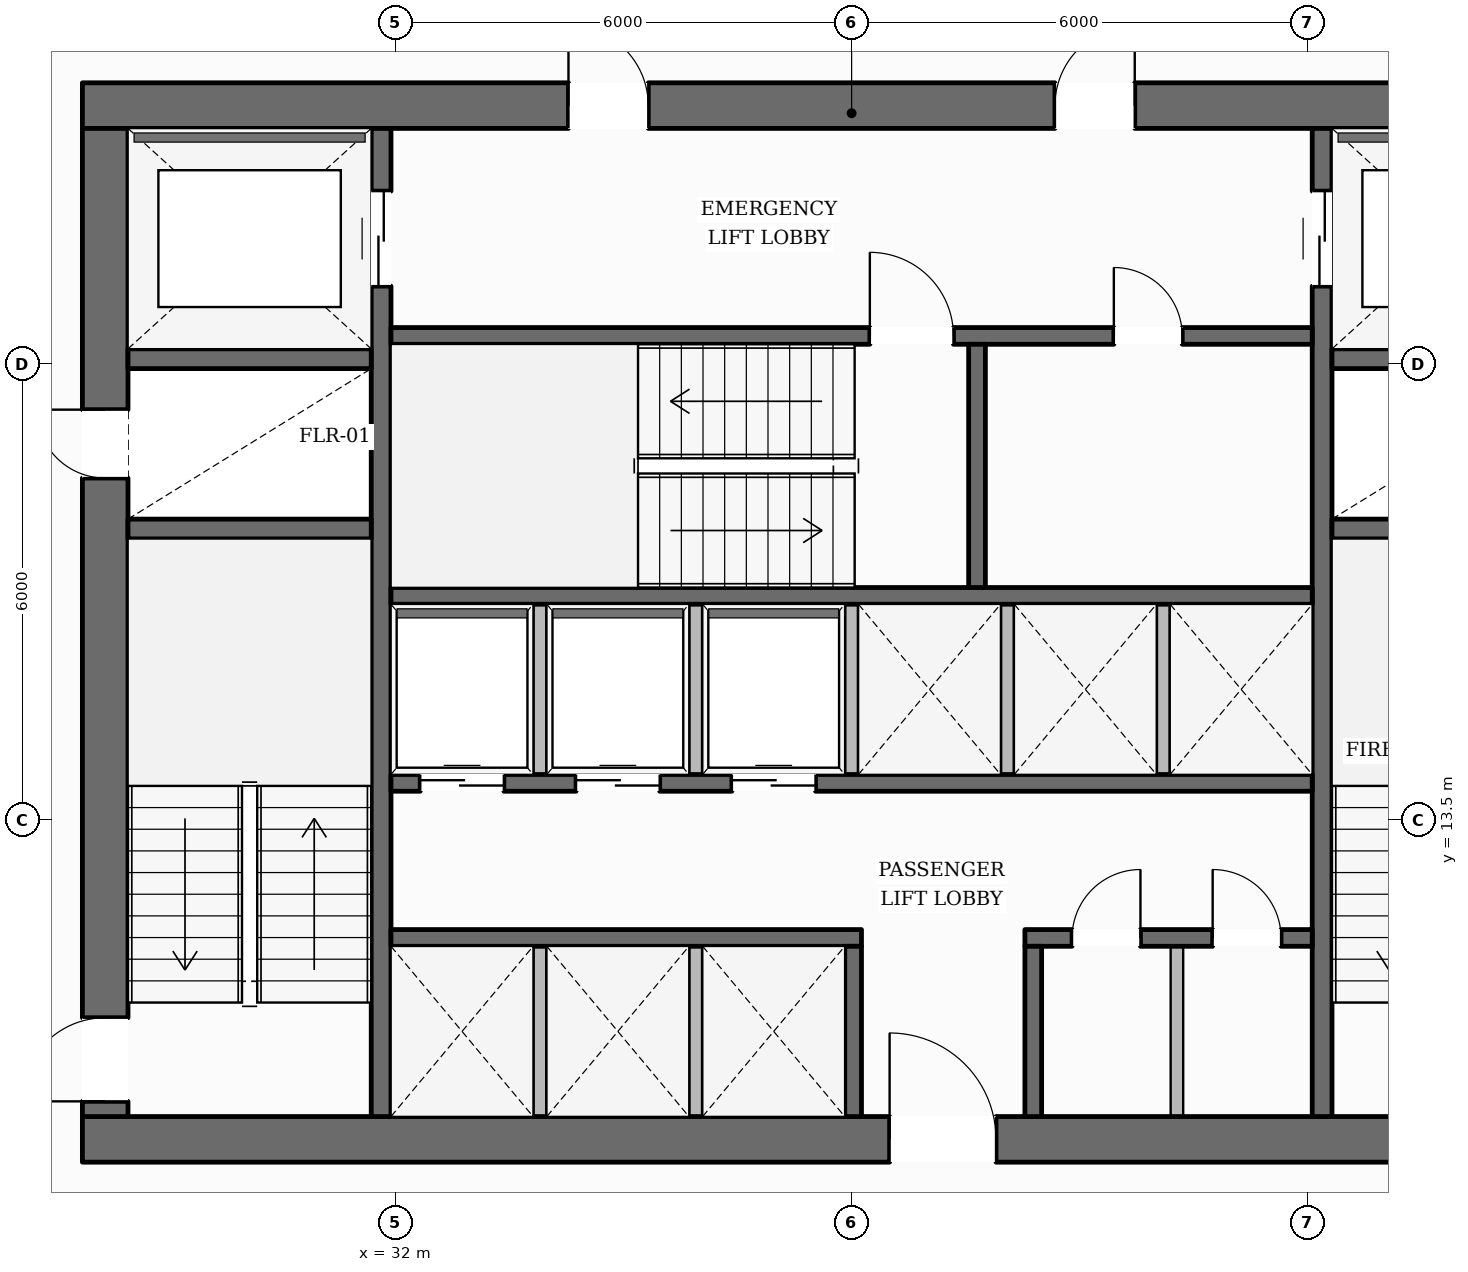
"""IFC4 building model, lengths in metres.
Left out: names, types, materials, properties, quantities, classifications, styles, units other than length and angle.
Written with IfcOpenShell. Run it as: python <this file> out.ifc"""

import sys

from ifc_helpers import new_model, si_unit, direction, frame, frame_2d, origin, place, context, subcontext, project, spatial, rectangle, extrude, element, fill, save


model = new_model("IFC4")
c1 = context("Model", 3, precision=1e-05, world=origin(), true_north=direction((0.0, 1.0)))
c2 = subcontext(c1, "Body", "Model", "MODEL_VIEW")
j1 = project(units=[si_unit("LENGTHUNIT", "METRE"), si_unit("PLANEANGLEUNIT", "RADIAN")], contexts=[c1])
p1 = place(None, origin())
s1 = spatial("IfcSite", under=j1, at=p1, CompositionType="ELEMENT")
p2 = place(p1, origin())
s2 = spatial("IfcBuilding", under=s1, at=p2, CompositionType="ELEMENT")
p3 = place(p2, frame((0.0, 0.0, 40.65)))
s3 = spatial("IfcBuildingStorey", under=s2, at=p3, CompositionType="ELEMENT", Elevation=40.65)
p4 = place(p3, frame((27.88, 9.3, 0.0), z_axis=(0.0, 0.0, 1.0), x_axis=(1.0, 0.0, 0.0)))
e1 = element("IfcWall", 1, at=p4, inside=s3, PredefinedType="SOLIDWALL", context=c2, shape_type="SweptSolid", body=[
    extrude(rectangle(XDim=20.24, YDim=0.6, at=frame_2d((10.12, 0.0))), origin(), (0.0, 0.0, 1.0), 3.59),
])
p5 = place(p4, frame((10.62, 0.0, 0.0)))
e2 = element("IfcOpeningElement", 2, at=p5, cuts=e1, PredefinedType="OPENING", context=c2, shape_type="SweptSolid", body=[
    extrude(rectangle(XDim=1.4, YDim=2.2, at=frame_2d((0.7, 1.1))), frame((0.0, 0.31, 0.0), z_axis=(0.0, -1.0, 0.0), x_axis=(1.0, 0.0, 0.0)), (0.0, 0.0, 1.0), 0.62),
])
p6 = place(p3, frame((27.88, 22.9, 0.0), z_axis=(0.0, 0.0, 1.0), x_axis=(1.0, 0.0, 0.0)))
e3 = element("IfcWall", 3, at=p6, inside=s3, PredefinedType="SOLIDWALL", context=c2, shape_type="SweptSolid", body=[
    extrude(rectangle(XDim=20.24, YDim=0.6, at=frame_2d((10.12, 0.0))), origin(), (0.0, 0.0, 1.0), 3.59),
])
p7 = place(p6, frame((6.395, 0.0, 0.0)))
e4 = element("IfcOpeningElement", 4, at=p7, cuts=e3, PredefinedType="OPENING", context=c2, shape_type="SweptSolid", body=[
    extrude(rectangle(XDim=1.05, YDim=2.15, at=frame_2d((0.525, 1.075))), frame((0.0, 0.31, 0.0), z_axis=(0.0, -1.0, 0.0), x_axis=(1.0, 0.0, 0.0)), (0.0, 0.0, 1.0), 0.62),
])
p8 = place(p6, frame((12.795, 0.0, 0.0)))
e5 = element("IfcOpeningElement", 5, at=p8, cuts=e3, PredefinedType="OPENING", context=c2, shape_type="SweptSolid", body=[
    extrude(rectangle(XDim=1.05, YDim=2.15, at=frame_2d((0.525, 1.075))), frame((0.0, 0.31, 0.0), z_axis=(0.0, -1.0, 0.0), x_axis=(1.0, 0.0, 0.0)), (0.0, 0.0, 1.0), 0.62),
])
p9 = place(p3, frame((28.18, 9.6, 0.0), z_axis=(0.0, 0.0, 1.0), x_axis=(0.0, 1.0, 0.0)))
e6 = element("IfcWall", 6, at=p9, inside=s3, PredefinedType="SOLIDWALL", context=c2, shape_type="SweptSolid", body=[
    extrude(rectangle(XDim=13.0, YDim=0.6, at=frame_2d((6.5, 0.0))), origin(), (0.0, 0.0, 1.0), 3.59),
])
p10 = place(p9, frame((0.2, 0.0, 0.0)))
e7 = element("IfcOpeningElement", 7, at=p10, cuts=e6, PredefinedType="OPENING", context=c2, shape_type="SweptSolid", body=[
    extrude(rectangle(XDim=1.1, YDim=2.15, at=frame_2d((0.55, 1.075))), frame((0.0, 0.31, 0.0), z_axis=(0.0, -1.0, 0.0), x_axis=(1.0, 0.0, 0.0)), (0.0, 0.0, 1.0), 0.62),
])
p11 = place(p9, frame((8.4, 0.0, 0.0)))
e8 = element("IfcOpeningElement", 8, at=p11, cuts=e6, PredefinedType="OPENING", context=c2, shape_type="SweptSolid", body=[
    extrude(rectangle(XDim=0.9, YDim=2.1, at=frame_2d((0.45, 1.05))), frame((0.0, 0.31, 0.0), z_axis=(0.0, -1.0, 0.0), x_axis=(1.0, 0.0, 0.0)), (0.0, 0.0, 1.0), 0.62),
])
p12 = place(p3, frame((31.81, 9.6, 0.0), z_axis=(0.0, 0.0, 1.0), x_axis=(0.0, 1.0, 0.0)))
e9 = element("IfcWall", 9, at=p12, inside=s3, PredefinedType="SHEAR", context=c2, shape_type="SweptSolid", body=[
    extrude(rectangle(XDim=13.0, YDim=0.26, at=frame_2d((6.5, 0.0))), origin(), (0.0, 0.0, 1.0), 3.59),
])
p13 = place(p12, frame((10.925, 0.0, 0.0)))
e10 = element("IfcOpeningElement", 10, at=p13, cuts=e9, PredefinedType="OPENING", context=c2, shape_type="SweptSolid", body=[
    extrude(rectangle(XDim=1.25, YDim=2.25, at=frame_2d((0.625, 1.125))), frame((0.0, 0.14, 0.0), z_axis=(0.0, -1.0, 0.0), x_axis=(1.0, 0.0, 0.0)), (0.0, 0.0, 1.0), 0.28),
])
p14 = place(p3, frame((44.19, 9.6, 0.0), z_axis=(0.0, 0.0, 1.0), x_axis=(0.0, 1.0, 0.0)))
e11 = element("IfcWall", 11, at=p14, inside=s3, PredefinedType="SHEAR", context=c2, shape_type="SweptSolid", body=[
    extrude(rectangle(XDim=13.0, YDim=0.26, at=frame_2d((6.5, 0.0))), origin(), (0.0, 0.0, 1.0), 3.59),
])
p15 = place(p14, frame((10.925, 0.0, 0.0)))
e12 = element("IfcOpeningElement", 12, at=p15, cuts=e11, PredefinedType="OPENING", context=c2, shape_type="SweptSolid", body=[
    extrude(rectangle(XDim=1.25, YDim=2.25, at=frame_2d((0.625, 1.125))), frame((0.0, 0.14, 0.0), z_axis=(0.0, -1.0, 0.0), x_axis=(1.0, 0.0, 0.0)), (0.0, 0.0, 1.0), 0.28),
])
for number, where, z_axis, x_axis in (
    (13, (28.48, 17.33, 0.0), (0.0, 0.0, 1.0), (1.0, 0.0, 0.0)),
    (14, (28.48, 19.57, 0.0), (0.0, 0.0, 1.0), (1.0, 0.0, 0.0)),
    (15, (44.32, 17.33, 0.0), (0.0, 0.0, 1.0), (1.0, 0.0, 0.0)),
    (16, (44.32, 19.57, 0.0), (0.0, 0.0, 1.0), (1.0, 0.0, 0.0)),
):
    element("IfcWall", number, at=place(p3, frame(where, z_axis=z_axis, x_axis=x_axis)), inside=s3, PredefinedType="SHEAR", context=c2, shape_type="SweptSolid", body=[
        extrude(rectangle(XDim=3.2, YDim=0.26, at=frame_2d((1.6, 0.0))), origin(), (0.0, 0.0, 1.0), 3.59),
    ])
p16 = place(p3, frame((31.94, 19.87, 0.0), z_axis=(0.0, 0.0, 1.0), x_axis=(1.0, 0.0, 0.0)))
e17 = element("IfcWall", 17, at=p16, inside=s3, PredefinedType="SOLIDWALL", context=c2, shape_type="SweptSolid", body=[
    extrude(rectangle(XDim=12.12, YDim=0.22, at=frame_2d((6.06, 0.0))), origin(), (0.0, 0.0, 1.0), 3.59),
])
p17 = place(p16, frame((6.3, 0.0, 0.0)))
e18 = element("IfcOpeningElement", 18, at=p17, cuts=e17, PredefinedType="OPENING", context=c2, shape_type="SweptSolid", body=[
    extrude(rectangle(XDim=1.1, YDim=2.15, at=frame_2d((0.55, 1.075))), frame((0.0, 0.12, 0.0), z_axis=(0.0, -1.0, 0.0), x_axis=(1.0, 0.0, 0.0)), (0.0, 0.0, 1.0), 0.24),
])
p18 = place(p16, frame((9.51, 0.0, 0.0)))
e19 = element("IfcOpeningElement", 19, at=p18, cuts=e17, PredefinedType="OPENING", context=c2, shape_type="SweptSolid", body=[
    extrude(rectangle(XDim=0.9, YDim=2.1, at=frame_2d((0.45, 1.05))), frame((0.0, 0.12, 0.0), z_axis=(0.0, -1.0, 0.0), x_axis=(1.0, 0.0, 0.0)), (0.0, 0.0, 1.0), 0.24),
])
p19 = place(p3, frame((31.94, 16.45, 0.0), z_axis=(0.0, 0.0, 1.0), x_axis=(1.0, 0.0, 0.0)))
e20 = element("IfcWall", 20, at=p19, inside=s3, PredefinedType="SOLIDWALL", context=c2, shape_type="SweptSolid", body=[
    extrude(rectangle(XDim=12.12, YDim=0.22, at=frame_2d((6.06, 0.0))), origin(), (0.0, 0.0, 1.0), 3.59),
])
p20 = place(p3, frame((39.65, 16.56, 0.0), z_axis=(0.0, 0.0, 1.0), x_axis=(0.0, 1.0, 0.0)))
e21 = element("IfcWall", 21, at=p20, inside=s3, PredefinedType="SOLIDWALL", context=c2, shape_type="SweptSolid", body=[
    extrude(rectangle(XDim=3.2, YDim=0.22, at=frame_2d((1.6, 0.0))), origin(), (0.0, 0.0, 1.0), 3.59),
])
p21 = place(p3, frame((31.94, 13.99, 0.0), z_axis=(0.0, 0.0, 1.0), x_axis=(1.0, 0.0, 0.0)))
e22 = element("IfcWall", 22, at=p21, inside=s3, PredefinedType="SOLIDWALL", context=c2, shape_type="SweptSolid", body=[
    extrude(rectangle(XDim=12.12, YDim=0.22, at=frame_2d((6.06, 0.0))), origin(), (0.0, 0.0, 1.0), 3.59),
])
p22 = place(p21, frame((0.385, 0.0, 0.0)))
e23 = element("IfcOpeningElement", 23, at=p22, cuts=e22, PredefinedType="OPENING", context=c2, shape_type="SweptSolid", body=[
    extrude(rectangle(XDim=1.1, YDim=2.2, at=frame_2d((0.55, 1.1))), frame((0.0, 0.12, 0.0), z_axis=(0.0, -1.0, 0.0), x_axis=(1.0, 0.0, 0.0)), (0.0, 0.0, 1.0), 0.24),
])
p23 = place(p21, frame((2.435, 0.0, 0.0)))
e24 = element("IfcOpeningElement", 24, at=p23, cuts=e22, PredefinedType="OPENING", context=c2, shape_type="SweptSolid", body=[
    extrude(rectangle(XDim=1.1, YDim=2.2, at=frame_2d((0.55, 1.1))), frame((0.0, 0.12, 0.0), z_axis=(0.0, -1.0, 0.0), x_axis=(1.0, 0.0, 0.0)), (0.0, 0.0, 1.0), 0.24),
])
p24 = place(p21, frame((4.485, 0.0, 0.0)))
e25 = element("IfcOpeningElement", 25, at=p24, cuts=e22, PredefinedType="OPENING", context=c2, shape_type="SweptSolid", body=[
    extrude(rectangle(XDim=1.1, YDim=2.2, at=frame_2d((0.55, 1.1))), frame((0.0, 0.12, 0.0), z_axis=(0.0, -1.0, 0.0), x_axis=(1.0, 0.0, 0.0)), (0.0, 0.0, 1.0), 0.24),
])
p25 = place(p3, frame((31.94, 11.95, 0.0), z_axis=(0.0, 0.0, 1.0), x_axis=(1.0, 0.0, 0.0)))
e26 = element("IfcWall", 26, at=p25, inside=s3, PredefinedType="SOLIDWALL", context=c2, shape_type="SweptSolid", body=[
    extrude(rectangle(XDim=6.19, YDim=0.22, at=frame_2d((3.095, 0.0))), origin(), (0.0, 0.0, 1.0), 3.59),
])
p26 = place(p3, frame((40.28, 11.95, 0.0), z_axis=(0.0, 0.0, 1.0), x_axis=(1.0, 0.0, 0.0)))
e27 = element("IfcWall", 27, at=p26, inside=s3, PredefinedType="SOLIDWALL", context=c2, shape_type="SweptSolid", body=[
    extrude(rectangle(XDim=3.78, YDim=0.22, at=frame_2d((1.89, 0.0))), origin(), (0.0, 0.0, 1.0), 3.59),
])
p27 = place(p26, frame((0.62, 0.0, 0.0)))
e28 = element("IfcOpeningElement", 28, at=p27, cuts=e27, PredefinedType="OPENING", context=c2, shape_type="SweptSolid", body=[
    extrude(rectangle(XDim=0.9, YDim=2.1, at=frame_2d((0.45, 1.05))), frame((0.0, 0.12, 0.0), z_axis=(0.0, -1.0, 0.0), x_axis=(1.0, 0.0, 0.0)), (0.0, 0.0, 1.0), 0.24),
])
p28 = place(p26, frame((2.47, 0.0, 0.0)))
e29 = element("IfcOpeningElement", 29, at=p28, cuts=e27, PredefinedType="OPENING", context=c2, shape_type="SweptSolid", body=[
    extrude(rectangle(XDim=0.9, YDim=2.1, at=frame_2d((0.45, 1.05))), frame((0.0, 0.12, 0.0), z_axis=(0.0, -1.0, 0.0), x_axis=(1.0, 0.0, 0.0)), (0.0, 0.0, 1.0), 0.24),
])
for number, where, z_axis, x_axis in (
    (30, (38.02, 9.6, 0.0), (0.0, 0.0, 1.0), (0.0, 1.0, 0.0)),
    (31, (40.39, 9.6, 0.0), (0.0, 0.0, 1.0), (0.0, 1.0, 0.0)),
):
    element("IfcWall", number, at=place(p3, frame(where, z_axis=z_axis, x_axis=x_axis)), inside=s3, PredefinedType="SOLIDWALL", context=c2, shape_type="SweptSolid", body=[
        extrude(rectangle(XDim=2.24, YDim=0.22, at=frame_2d((1.12, 0.0))), origin(), (0.0, 0.0, 1.0), 3.59),
    ])
p29 = place(p3, frame((13.324, 14.608, 0.0), z_axis=(0.0, 0.0, 1.0), x_axis=(0.495909124573, 0.868374423947, 0.0)))
e32 = element("IfcWall", 32, at=p29, inside=s3, PredefinedType="STANDARD", context=c2, shape_type="SweptSolid", body=[
    extrude(rectangle(XDim=34.553, YDim=0.38, at=frame_2d((17.277, 0.0))), origin(), (0.0, 0.0, 1.0), 2.97),
])
p30 = place(p29, frame((30.448, 0.0, 0.65)))
e33 = element("IfcOpeningElement", 33, at=p30, cuts=e32, PredefinedType="OPENING", context=c2, shape_type="SweptSolid", body=[
    extrude(rectangle(XDim=1.65, YDim=1.75, at=frame_2d((0.825, 0.875))), frame((0.0, 0.2, 0.0), z_axis=(0.0, -1.0, 0.0), x_axis=(1.0, 0.0, 0.0)), (0.0, 0.0, 1.0), 0.4),
])
p31 = place(p29, frame((24.849, 0.0, 0.65)))
e34 = element("IfcOpeningElement", 34, at=p31, cuts=e32, PredefinedType="OPENING", context=c2, shape_type="SweptSolid", body=[
    extrude(rectangle(XDim=1.65, YDim=1.75, at=frame_2d((0.825, 0.875))), frame((0.0, 0.2, 0.0), z_axis=(0.0, -1.0, 0.0), x_axis=(1.0, 0.0, 0.0)), (0.0, 0.0, 1.0), 0.4),
])
p32 = place(p29, frame((19.249, 0.0, 0.65)))
e35 = element("IfcOpeningElement", 35, at=p32, cuts=e32, PredefinedType="OPENING", context=c2, shape_type="SweptSolid", body=[
    extrude(rectangle(XDim=1.65, YDim=1.75, at=frame_2d((0.825, 0.875))), frame((0.0, 0.2, 0.0), z_axis=(0.0, -1.0, 0.0), x_axis=(1.0, 0.0, 0.0)), (0.0, 0.0, 1.0), 0.4),
])
p33 = place(p29, frame((8.05, 0.0, 0.65)))
e36 = element("IfcOpeningElement", 36, at=p33, cuts=e32, PredefinedType="OPENING", context=c2, shape_type="SweptSolid", body=[
    extrude(rectangle(XDim=1.65, YDim=1.75, at=frame_2d((0.825, 0.875))), frame((0.0, 0.2, 0.0), z_axis=(0.0, -1.0, 0.0), x_axis=(1.0, 0.0, 0.0)), (0.0, 0.0, 1.0), 0.4),
])
p34 = place(p29, frame((2.451, 0.0, 0.65)))
e37 = element("IfcOpeningElement", 37, at=p34, cuts=e32, PredefinedType="OPENING", context=c2, shape_type="SweptSolid", body=[
    extrude(rectangle(XDim=1.65, YDim=1.75, at=frame_2d((0.825, 0.875))), frame((0.0, 0.2, 0.0), z_axis=(0.0, -1.0, 0.0), x_axis=(1.0, 0.0, 0.0)), (0.0, 0.0, 1.0), 0.4),
])
for number, where, z_axis, x_axis in (
    (38, (33.9, 9.6, 0.0), (0.0, 0.0, 1.0), (0.0, 1.0, 0.0)),
    (39, (35.95, 9.6, 0.0), (0.0, 0.0, 1.0), (0.0, 1.0, 0.0)),
    (40, (33.9, 14.1, 0.0), (0.0, 0.0, 1.0), (0.0, 1.0, 0.0)),
    (41, (35.95, 14.1, 0.0), (0.0, 0.0, 1.0), (0.0, 1.0, 0.0)),
    (42, (38.0, 14.1, 0.0), (0.0, 0.0, 1.0), (0.0, 1.0, 0.0)),
    (43, (40.05, 14.1, 0.0), (0.0, 0.0, 1.0), (0.0, 1.0, 0.0)),
    (44, (42.1, 14.1, 0.0), (0.0, 0.0, 1.0), (0.0, 1.0, 0.0)),
    (45, (42.28, 9.6, 0.0), (0.0, 0.0, 1.0), (0.0, 1.0, 0.0)),
):
    element("IfcWall", number, at=place(p3, frame(where, z_axis=z_axis, x_axis=x_axis)), inside=s3, PredefinedType="PARTITIONING", context=c2, shape_type="SweptSolid", body=[
        extrude(rectangle(XDim=2.24, YDim=0.165, at=frame_2d((1.12, 0.0))), origin(), (0.0, 0.0, 1.0), 3.59),
    ])
p35 = place(p10, origin())
e46 = element("IfcDoor", 46, at=p35, inside=s3, OperationType="SINGLE_SWING_LEFT", PredefinedType="DOOR", context=c2, shape_type="SweptSolid", body=[
    extrude(rectangle(XDim=1.1, YDim=2.15, at=frame_2d((0.55, 1.075))), frame((0.0, 0.025, 0.0), z_axis=(0.0, -1.0, 0.0), x_axis=(1.0, 0.0, 0.0)), (0.0, 0.0, 1.0), 0.05),
])
fill(e7, e46)
p36 = place(p17, origin())
e47 = element("IfcDoor", 47, at=p36, inside=s3, OperationType="SINGLE_SWING_LEFT", PredefinedType="DOOR", context=c2, shape_type="SweptSolid", body=[
    extrude(rectangle(XDim=1.1, YDim=2.15, at=frame_2d((0.55, 1.075))), frame((0.0, 0.025, 0.0), z_axis=(0.0, -1.0, 0.0), x_axis=(1.0, 0.0, 0.0)), (0.0, 0.0, 1.0), 0.05),
])
fill(e18, e47)
p37 = place(p11, origin())
e48 = element("IfcDoor", 48, at=p37, inside=s3, OperationType="SINGLE_SWING_RIGHT", PredefinedType="DOOR", context=c2, shape_type="SweptSolid", body=[
    extrude(rectangle(XDim=0.9, YDim=2.1, at=frame_2d((0.45, 1.05))), frame((0.0, 0.025, 0.0), z_axis=(0.0, -1.0, 0.0), x_axis=(1.0, 0.0, 0.0)), (0.0, 0.0, 1.0), 0.05),
])
fill(e8, e48)
p38 = place(p7, origin())
e49 = element("IfcDoor", 49, at=p38, inside=s3, OperationType="SINGLE_SWING_LEFT", PredefinedType="DOOR", context=c2, shape_type="SweptSolid", body=[
    extrude(rectangle(XDim=1.05, YDim=2.15, at=frame_2d((0.525, 1.075))), frame((0.0, 0.025, 0.0), z_axis=(0.0, -1.0, 0.0), x_axis=(1.0, 0.0, 0.0)), (0.0, 0.0, 1.0), 0.05),
])
fill(e4, e49)
p39 = place(p8, origin())
e50 = element("IfcDoor", 50, at=p39, inside=s3, OperationType="SINGLE_SWING_RIGHT", PredefinedType="DOOR", context=c2, shape_type="SweptSolid", body=[
    extrude(rectangle(XDim=1.05, YDim=2.15, at=frame_2d((0.525, 1.075))), frame((0.0, 0.025, 0.0), z_axis=(0.0, -1.0, 0.0), x_axis=(1.0, 0.0, 0.0)), (0.0, 0.0, 1.0), 0.05),
])
fill(e5, e50)
p40 = place(p13, origin())
e51 = element("IfcDoor", 51, at=p40, inside=s3, OperationType="DOUBLE_DOOR_SLIDING", PredefinedType="DOOR", context=c2, shape_type="SweptSolid", body=[
    extrude(rectangle(XDim=1.25, YDim=2.25, at=frame_2d((0.625, 1.125))), frame((0.0, 0.025, 0.0), z_axis=(0.0, -1.0, 0.0), x_axis=(1.0, 0.0, 0.0)), (0.0, 0.0, 1.0), 0.05),
])
fill(e10, e51)
p41 = place(p15, origin())
e52 = element("IfcDoor", 52, at=p41, inside=s3, OperationType="DOUBLE_DOOR_SLIDING", PredefinedType="DOOR", context=c2, shape_type="SweptSolid", body=[
    extrude(rectangle(XDim=1.25, YDim=2.25, at=frame_2d((0.625, 1.125))), frame((0.0, 0.025, 0.0), z_axis=(0.0, -1.0, 0.0), x_axis=(1.0, 0.0, 0.0)), (0.0, 0.0, 1.0), 0.05),
])
fill(e12, e52)
p42 = place(p5, origin())
e53 = element("IfcDoor", 53, at=p42, inside=s3, OperationType="SINGLE_SWING_LEFT", PredefinedType="DOOR", context=c2, shape_type="SweptSolid", body=[
    extrude(rectangle(XDim=1.4, YDim=2.2, at=frame_2d((0.7, 1.1))), frame((0.0, 0.025, 0.0), z_axis=(0.0, -1.0, 0.0), x_axis=(1.0, 0.0, 0.0)), (0.0, 0.0, 1.0), 0.05),
])
fill(e2, e53)
p43 = place(p22, origin())
e54 = element("IfcDoor", 54, at=p43, inside=s3, OperationType="DOUBLE_DOOR_SLIDING", PredefinedType="DOOR", context=c2, shape_type="SweptSolid", body=[
    extrude(rectangle(XDim=1.1, YDim=2.2, at=frame_2d((0.55, 1.1))), frame((0.0, 0.025, 0.0), z_axis=(0.0, -1.0, 0.0), x_axis=(1.0, 0.0, 0.0)), (0.0, 0.0, 1.0), 0.05),
])
fill(e23, e54)
p44 = place(p23, origin())
e55 = element("IfcDoor", 55, at=p44, inside=s3, OperationType="DOUBLE_DOOR_SLIDING", PredefinedType="DOOR", context=c2, shape_type="SweptSolid", body=[
    extrude(rectangle(XDim=1.1, YDim=2.2, at=frame_2d((0.55, 1.1))), frame((0.0, 0.025, 0.0), z_axis=(0.0, -1.0, 0.0), x_axis=(1.0, 0.0, 0.0)), (0.0, 0.0, 1.0), 0.05),
])
fill(e24, e55)
p45 = place(p24, origin())
e56 = element("IfcDoor", 56, at=p45, inside=s3, OperationType="DOUBLE_DOOR_SLIDING", PredefinedType="DOOR", context=c2, shape_type="SweptSolid", body=[
    extrude(rectangle(XDim=1.1, YDim=2.2, at=frame_2d((0.55, 1.1))), frame((0.0, 0.025, 0.0), z_axis=(0.0, -1.0, 0.0), x_axis=(1.0, 0.0, 0.0)), (0.0, 0.0, 1.0), 0.05),
])
fill(e25, e56)
p46 = place(p18, origin())
e57 = element("IfcDoor", 57, at=p46, inside=s3, OperationType="SINGLE_SWING_LEFT", PredefinedType="DOOR", context=c2, shape_type="SweptSolid", body=[
    extrude(rectangle(XDim=0.9, YDim=2.1, at=frame_2d((0.45, 1.05))), frame((0.0, 0.025, 0.0), z_axis=(0.0, -1.0, 0.0), x_axis=(1.0, 0.0, 0.0)), (0.0, 0.0, 1.0), 0.05),
])
fill(e19, e57)
p47 = place(p27, origin())
e58 = element("IfcDoor", 58, at=p47, inside=s3, OperationType="SINGLE_SWING_RIGHT", PredefinedType="DOOR", context=c2, shape_type="SweptSolid", body=[
    extrude(rectangle(XDim=0.9, YDim=2.1, at=frame_2d((0.45, 1.05))), frame((0.0, 0.025, 0.0), z_axis=(0.0, -1.0, 0.0), x_axis=(1.0, 0.0, 0.0)), (0.0, 0.0, 1.0), 0.05),
])
fill(e28, e58)
p48 = place(p28, origin())
e59 = element("IfcDoor", 59, at=p48, inside=s3, OperationType="SINGLE_SWING_LEFT", PredefinedType="DOOR", context=c2, shape_type="SweptSolid", body=[
    extrude(rectangle(XDim=0.9, YDim=2.1, at=frame_2d((0.45, 1.05))), frame((0.0, 0.025, 0.0), z_axis=(0.0, -1.0, 0.0), x_axis=(1.0, 0.0, 0.0)), (0.0, 0.0, 1.0), 0.05),
])
fill(e29, e59)
save(model, sys.argv[1])
